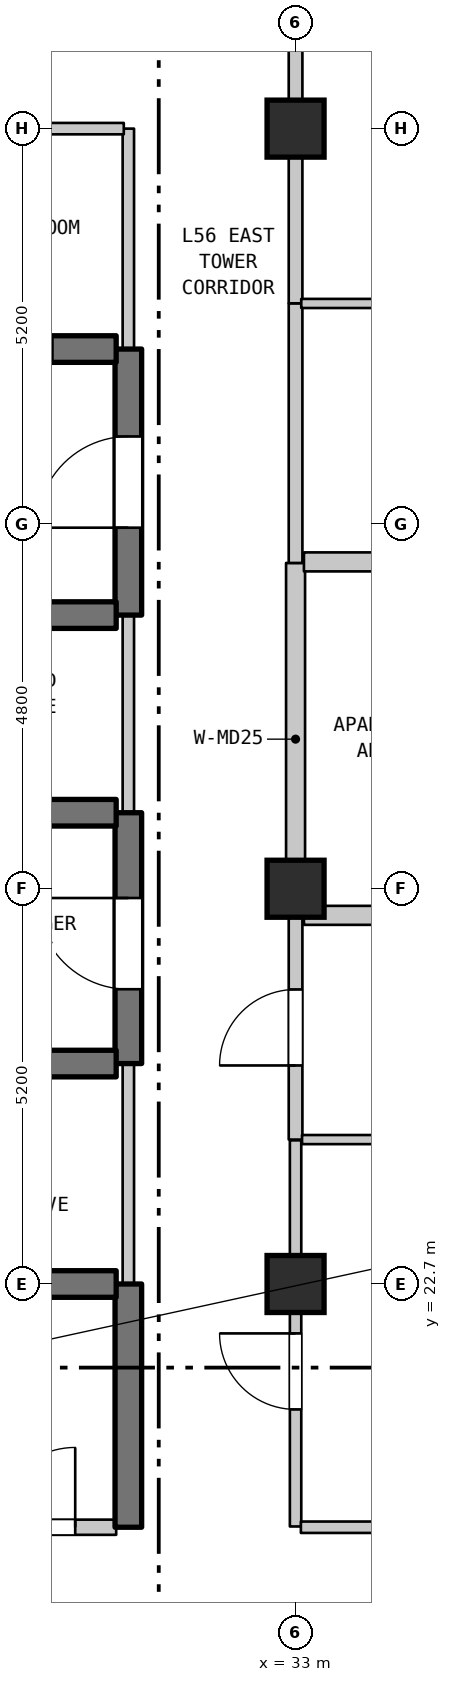
"""IFC4 building model, lengths in metres.
Left out: names, types, materials, properties, quantities, classifications, styles, units other than length and angle.
Written with IfcOpenShell. Run it as: python <this file> out.ifc"""

import sys

from ifc_helpers import new_model, si_unit, direction, frame, frame_2d, origin, origin_2d, place, context, subcontext, project, spatial, rectangle, extrude, element, fill, save


model = new_model("IFC4")
c1 = context("Model", 3, precision=1e-05, world=origin(), true_north=direction((0.0, 1.0)))
c2 = subcontext(c1, "Body", "Model", "MODEL_VIEW")
j1 = project(units=[si_unit("LENGTHUNIT", "METRE"), si_unit("PLANEANGLEUNIT", "RADIAN")], contexts=[c1])
p1 = place(None, origin())
s1 = spatial("IfcSite", under=j1, at=p1, CompositionType="ELEMENT")
p2 = place(p1, origin())
s2 = spatial("IfcBuilding", under=s1, at=p2, CompositionType="ELEMENT")
p3 = place(p2, frame((0.0, 0.0, 226.5)))
s3 = spatial("IfcBuildingStorey", under=s2, at=p3, CompositionType="ELEMENT", Elevation=226.5)
for number, where, z_axis, x_axis in (
    (1, (33.0, 22.7, 0.0), (0.0, 0.0, 1.0), (1.0, 0.0, 0.0)),
    (2, (33.0, 27.9, 0.0), (0.0, 0.0, 1.0), (1.0, 0.0, 0.0)),
    (3, (33.0, 37.9, 0.0), (0.0, 0.0, 1.0), (1.0, 0.0, 0.0)),
):
    element("IfcColumn", number, at=place(p3, frame(where, z_axis=z_axis, x_axis=x_axis)), inside=s3, PredefinedType="COLUMN", context=c2, shape_type="SweptSolid", body=[
        extrude(rectangle(XDim=0.75, YDim=0.75, at=origin_2d()), origin(), (0.0, 0.0, 1.0), 3.7),
    ])
p4 = place(p3, frame((30.8, 19.5, 0.0), z_axis=(0.0, 0.0, 1.0), x_axis=(0.0, 1.0, 0.0)))
e4 = element("IfcWall", 4, at=p4, inside=s3, PredefinedType="SHEAR", context=c2, shape_type="SweptSolid", body=[
    extrude(rectangle(XDim=3.2, YDim=0.35, at=frame_2d((1.6, 0.0))), origin(), (0.0, 0.0, 1.0), 3.39),
])
p5 = place(p3, frame((30.8, 22.7, 0.0), z_axis=(0.0, 0.0, 1.0), x_axis=(0.0, 1.0, 0.0)))
e5 = element("IfcWall", 5, at=p5, inside=s3, PredefinedType="STANDARD", context=c2, shape_type="SweptSolid", body=[
    extrude(rectangle(XDim=2.9, YDim=0.15, at=frame_2d((1.45, 0.0))), origin(), (0.0, 0.0, 1.0), 3.39),
])
p6 = place(p3, frame((30.8, 25.6, 0.0), z_axis=(0.0, 0.0, 1.0), x_axis=(0.0, 1.0, 0.0)))
e6 = element("IfcWall", 6, at=p6, inside=s3, PredefinedType="SHEAR", context=c2, shape_type="SweptSolid", body=[
    extrude(rectangle(XDim=3.3, YDim=0.35, at=frame_2d((1.65, 0.0))), origin(), (0.0, 0.0, 1.0), 3.39),
])
p7 = place(p6, frame((0.978, 0.0, 0.0)))
e7 = element("IfcOpeningElement", 7, at=p7, cuts=e6, PredefinedType="OPENING", context=c2, shape_type="SweptSolid", body=[
    extrude(rectangle(XDim=1.2, YDim=2.2, at=frame_2d((0.6, 1.1))), frame((0.0, 0.185, 0.0), z_axis=(0.0, -1.0, 0.0), x_axis=(1.0, 0.0, 0.0)), (0.0, 0.0, 1.0), 0.37),
])
p8 = place(p3, frame((30.8, 28.9, 0.0), z_axis=(0.0, 0.0, 1.0), x_axis=(0.0, 1.0, 0.0)))
e8 = element("IfcWall", 8, at=p8, inside=s3, PredefinedType="STANDARD", context=c2, shape_type="SweptSolid", body=[
    extrude(rectangle(XDim=2.6, YDim=0.15, at=frame_2d((1.3, 0.0))), origin(), (0.0, 0.0, 1.0), 3.39),
])
p9 = place(p3, frame((30.8, 31.5, 0.0), z_axis=(0.0, 0.0, 1.0), x_axis=(0.0, 1.0, 0.0)))
e9 = element("IfcWall", 9, at=p9, inside=s3, PredefinedType="SHEAR", context=c2, shape_type="SweptSolid", body=[
    extrude(rectangle(XDim=3.5, YDim=0.35, at=frame_2d((1.75, 0.0))), origin(), (0.0, 0.0, 1.0), 3.39),
])
p10 = place(p9, frame((1.15, 0.0, 0.0)))
e10 = element("IfcOpeningElement", 10, at=p10, cuts=e9, PredefinedType="OPENING", context=c2, shape_type="SweptSolid", body=[
    extrude(rectangle(XDim=1.2, YDim=2.2, at=frame_2d((0.6, 1.1))), frame((0.0, 0.185, 0.0), z_axis=(0.0, -1.0, 0.0), x_axis=(1.0, 0.0, 0.0)), (0.0, 0.0, 1.0), 0.37),
])
p11 = place(p3, frame((30.8, 35.0, 0.0), z_axis=(0.0, 0.0, 1.0), x_axis=(0.0, 1.0, 0.0)))
e11 = element("IfcWall", 11, at=p11, inside=s3, PredefinedType="STANDARD", context=c2, shape_type="SweptSolid", body=[
    extrude(rectangle(XDim=2.9, YDim=0.15, at=frame_2d((1.45, 0.0))), origin(), (0.0, 0.0, 1.0), 3.39),
])
p12 = place(p3, frame((33.0, 19.51, 0.0), z_axis=(0.0, 0.0, 1.0), x_axis=(0.0, 1.0, 0.0)))
e12 = element("IfcWall", 12, at=p12, inside=s3, PredefinedType="STANDARD", context=c2, shape_type="SweptSolid", body=[
    extrude(rectangle(XDim=5.08, YDim=0.15, at=frame_2d((2.54, 0.0))), origin(), (0.0, 0.0, 1.0), 2.99),
])
p13 = place(p12, frame((1.54, 0.0, 0.0)))
e13 = element("IfcOpeningElement", 13, at=p13, cuts=e12, PredefinedType="OPENING", context=c2, shape_type="SweptSolid", body=[
    extrude(rectangle(XDim=1.0, YDim=2.15, at=frame_2d((0.5, 1.075))), frame((0.0, 0.085, 0.0), z_axis=(0.0, -1.0, 0.0), x_axis=(1.0, 0.0, 0.0)), (0.0, 0.0, 1.0), 0.17),
])
p14 = place(p3, frame((33.0, 24.6, 0.0), z_axis=(0.0, 0.0, 1.0), x_axis=(0.0, 1.0, 0.0)))
e14 = element("IfcWall", 14, at=p14, inside=s3, PredefinedType="STANDARD", context=c2, shape_type="SweptSolid", body=[
    extrude(rectangle(XDim=2.95, YDim=0.18, at=frame_2d((1.475, 0.0))), origin(), (0.0, 0.0, 1.0), 2.99),
])
p15 = place(p14, frame((0.975, 0.0, 0.0)))
e15 = element("IfcOpeningElement", 15, at=p15, cuts=e14, PredefinedType="OPENING", context=c2, shape_type="SweptSolid", body=[
    extrude(rectangle(XDim=1.0, YDim=2.15, at=frame_2d((0.5, 1.075))), frame((0.0, 0.1, 0.0), z_axis=(0.0, -1.0, 0.0), x_axis=(1.0, 0.0, 0.0)), (0.0, 0.0, 1.0), 0.2),
])
p16 = place(p3, frame((33.0, 27.55, 0.0), z_axis=(0.0, 0.0, 1.0), x_axis=(0.0, 1.0, 0.0)))
e16 = element("IfcWall", 16, at=p16, inside=s3, PredefinedType="STANDARD", context=c2, shape_type="SweptSolid", body=[
    extrude(rectangle(XDim=4.636, YDim=0.25, at=frame_2d((2.318, 0.0))), origin(), (0.0, 0.0, 1.0), 2.89),
])
p17 = place(p3, frame((33.0, 32.186, 0.0), z_axis=(0.0, 0.0, 1.0), x_axis=(0.0, 1.0, 0.0)))
e17 = element("IfcWall", 17, at=p17, inside=s3, PredefinedType="STANDARD", context=c2, shape_type="SweptSolid", body=[
    extrude(rectangle(XDim=3.416, YDim=0.18, at=frame_2d((1.708, 0.0))), origin(), (0.0, 0.0, 1.0), 2.89),
])
p18 = place(p3, frame((33.0, 35.602, 0.0), z_axis=(0.0, 0.0, 1.0), x_axis=(0.0, 1.0, 0.0)))
e18 = element("IfcWall", 18, at=p18, inside=s3, PredefinedType="STANDARD", context=c2, shape_type="SweptSolid", body=[
    extrude(rectangle(XDim=2.298, YDim=0.18, at=frame_2d((1.149, 0.0))), origin(), (0.0, 0.0, 1.0), 2.89),
])
p19 = place(p3, frame((28.585, 19.5, 0.0), z_axis=(0.0, 0.0, 1.0), x_axis=(1.0, 0.0, 0.0)))
e19 = element("IfcWall", 19, at=p19, inside=s3, PredefinedType="STANDARD", context=c2, shape_type="SweptSolid", body=[
    extrude(rectangle(XDim=2.055, YDim=0.2, at=frame_2d((1.027, 0.0))), origin(), (0.0, 0.0, 1.0), 3.39),
])
p20 = place(p19, frame((0.466, 0.0, 0.0)))
e20 = element("IfcOpeningElement", 20, at=p20, cuts=e19, PredefinedType="OPENING", context=c2, shape_type="SweptSolid", body=[
    extrude(rectangle(XDim=1.05, YDim=2.15, at=frame_2d((0.525, 1.075))), frame((0.0, 0.11, 0.0), z_axis=(0.0, -1.0, 0.0), x_axis=(1.0, 0.0, 0.0)), (0.0, 0.0, 1.0), 0.22),
])
p21 = place(p3, frame((33.07, 19.5, 0.0), z_axis=(0.0, 0.0, 1.0), x_axis=(1.0, 0.0, 0.0)))
e21 = element("IfcWall", 21, at=p21, inside=s3, PredefinedType="STANDARD", context=c2, shape_type="SweptSolid", body=[
    extrude(rectangle(XDim=18.87, YDim=0.15, at=frame_2d((9.435, 0.0))), origin(), (0.0, 0.0, 1.0), 3.39),
])
p22 = place(p21, frame((8.935, 0.0, 0.0)))
e22 = element("IfcOpeningElement", 22, at=p22, cuts=e21, PredefinedType="OPENING", context=c2, shape_type="SweptSolid", body=[
    extrude(rectangle(XDim=1.0, YDim=2.15, at=frame_2d((0.5, 1.075))), frame((0.0, 0.085, 0.0), z_axis=(0.0, -1.0, 0.0), x_axis=(1.0, 0.0, 0.0)), (0.0, 0.0, 1.0), 0.17),
])
p23 = place(p3, frame((28.585, 22.7, 0.0), z_axis=(0.0, 0.0, 1.0), x_axis=(1.0, 0.0, 0.0)))
e23 = element("IfcWall", 23, at=p23, inside=s3, PredefinedType="SHEAR", context=c2, shape_type="SweptSolid", body=[
    extrude(rectangle(XDim=2.055, YDim=0.35, at=frame_2d((1.027, 0.0))), origin(), (0.0, 0.0, 1.0), 3.39),
])
p24 = place(p3, frame((33.085, 24.6, 0.0), z_axis=(0.0, 0.0, 1.0), x_axis=(1.0, 0.0, 0.0)))
e24 = element("IfcWall", 24, at=p24, inside=s3, PredefinedType="PARTITIONING", context=c2, shape_type="SweptSolid", body=[
    extrude(rectangle(XDim=3.47, YDim=0.12, at=frame_2d((1.735, 0.0))), origin(), (0.0, 0.0, 1.0), 3.39),
])
p25 = place(p3, frame((27.46, 25.6, 0.0), z_axis=(0.0, 0.0, 1.0), x_axis=(1.0, 0.0, 0.0)))
e25 = element("IfcWall", 25, at=p25, inside=s3, PredefinedType="SHEAR", context=c2, shape_type="SweptSolid", body=[
    extrude(rectangle(XDim=3.18, YDim=0.35, at=frame_2d((1.59, 0.0))), origin(), (0.0, 0.0, 1.0), 3.39),
])
p26 = place(p25, frame((1.115, 0.0, 0.0)))
e26 = element("IfcOpeningElement", 26, at=p26, cuts=e25, PredefinedType="OPENING", context=c2, shape_type="SweptSolid", body=[
    extrude(rectangle(XDim=0.95, YDim=2.15, at=frame_2d((0.475, 1.075))), frame((0.0, 0.185, 0.0), z_axis=(0.0, -1.0, 0.0), x_axis=(1.0, 0.0, 0.0)), (0.0, 0.0, 1.0), 0.37),
])
p27 = place(p3, frame((33.11, 27.55, 0.0), z_axis=(0.0, 0.0, 1.0), x_axis=(1.0, 0.0, 0.0)))
e27 = element("IfcWall", 27, at=p27, inside=s3, PredefinedType="STANDARD", context=c2, shape_type="SweptSolid", body=[
    extrude(rectangle(XDim=4.36, YDim=0.25, at=frame_2d((2.18, 0.0))), origin(), (0.0, 0.0, 1.0), 3.39),
])
p28 = place(p3, frame((27.46, 28.9, 0.0), z_axis=(0.0, 0.0, 1.0), x_axis=(1.0, 0.0, 0.0)))
e28 = element("IfcWall", 28, at=p28, inside=s3, PredefinedType="SHEAR", context=c2, shape_type="SweptSolid", body=[
    extrude(rectangle(XDim=3.18, YDim=0.35, at=frame_2d((1.59, 0.0))), origin(), (0.0, 0.0, 1.0), 3.39),
])
p29 = place(p28, frame((1.115, 0.0, 0.0)))
e29 = element("IfcOpeningElement", 29, at=p29, cuts=e28, PredefinedType="OPENING", context=c2, shape_type="SweptSolid", body=[
    extrude(rectangle(XDim=0.95, YDim=2.15, at=frame_2d((0.475, 1.075))), frame((0.0, 0.185, 0.0), z_axis=(0.0, -1.0, 0.0), x_axis=(1.0, 0.0, 0.0)), (0.0, 0.0, 1.0), 0.37),
])
p30 = place(p3, frame((27.46, 31.5, 0.0), z_axis=(0.0, 0.0, 1.0), x_axis=(1.0, 0.0, 0.0)))
e30 = element("IfcWall", 30, at=p30, inside=s3, PredefinedType="SHEAR", context=c2, shape_type="SweptSolid", body=[
    extrude(rectangle(XDim=3.18, YDim=0.35, at=frame_2d((1.59, 0.0))), origin(), (0.0, 0.0, 1.0), 3.39),
])
p31 = place(p3, frame((33.11, 32.2, 0.0), z_axis=(0.0, 0.0, 1.0), x_axis=(1.0, 0.0, 0.0)))
e31 = element("IfcWall", 31, at=p31, inside=s3, PredefinedType="STANDARD", context=c2, shape_type="SweptSolid", body=[
    extrude(rectangle(XDim=4.36, YDim=0.25, at=frame_2d((2.18, 0.0))), origin(), (0.0, 0.0, 1.0), 3.39),
])
p32 = place(p3, frame((28.045, 35.0, 0.0), z_axis=(0.0, 0.0, 1.0), x_axis=(1.0, 0.0, 0.0)))
e32 = element("IfcWall", 32, at=p32, inside=s3, PredefinedType="SHEAR", context=c2, shape_type="SweptSolid", body=[
    extrude(rectangle(XDim=2.595, YDim=0.35, at=frame_2d((1.297, 0.0))), origin(), (0.0, 0.0, 1.0), 3.39),
])
p33 = place(p32, frame((0.806, 0.0, 0.0)))
e33 = element("IfcOpeningElement", 33, at=p33, cuts=e32, PredefinedType="OPENING", context=c2, shape_type="SweptSolid", body=[
    extrude(rectangle(XDim=0.95, YDim=2.15, at=frame_2d((0.475, 1.075))), frame((0.0, 0.185, 0.0), z_axis=(0.0, -1.0, 0.0), x_axis=(1.0, 0.0, 0.0)), (0.0, 0.0, 1.0), 0.37),
])
p34 = place(p3, frame((33.075, 35.6, 0.0), z_axis=(0.0, 0.0, 1.0), x_axis=(1.0, 0.0, 0.0)))
e34 = element("IfcWall", 34, at=p34, inside=s3, PredefinedType="PARTITIONING", context=c2, shape_type="SweptSolid", body=[
    extrude(rectangle(XDim=4.46, YDim=0.12, at=frame_2d((2.23, 0.0))), origin(), (0.0, 0.0, 1.0), 3.39),
])
p35 = place(p3, frame((28.045, 37.9, 0.0), z_axis=(0.0, 0.0, 1.0), x_axis=(1.0, 0.0, 0.0)))
e35 = element("IfcWall", 35, at=p35, inside=s3, PredefinedType="STANDARD", context=c2, shape_type="SweptSolid", body=[
    extrude(rectangle(XDim=2.695, YDim=0.15, at=frame_2d((1.348, 0.0))), origin(), (0.0, 0.0, 1.0), 2.89),
])
p36 = place(p3, frame((33.0, 37.9, 0.0), z_axis=(0.0, 0.0, 1.0), x_axis=(0.0, 1.0, 0.0)))
e36 = element("IfcWall", 36, at=p36, inside=s3, PredefinedType="STANDARD", context=c2, shape_type="SweptSolid", body=[
    extrude(rectangle(XDim=1.85, YDim=0.18, at=frame_2d((0.925, 0.0))), origin(), (0.0, 0.0, 1.0), 2.79),
])
p37 = place(p7, origin())
e37 = element("IfcDoor", 37, at=p37, inside=s3, OperationType="SINGLE_SWING_RIGHT", PredefinedType="DOOR", context=c2, shape_type="SweptSolid", body=[
    extrude(rectangle(XDim=1.2, YDim=2.2, at=frame_2d((0.6, 1.1))), frame((0.0, 0.025, 0.0), z_axis=(0.0, -1.0, 0.0), x_axis=(1.0, 0.0, 0.0)), (0.0, 0.0, 1.0), 0.05),
])
fill(e7, e37)
p38 = place(p10, origin())
e38 = element("IfcDoor", 38, at=p38, inside=s3, OperationType="SINGLE_SWING_LEFT", PredefinedType="DOOR", context=c2, shape_type="SweptSolid", body=[
    extrude(rectangle(XDim=1.2, YDim=2.2, at=frame_2d((0.6, 1.1))), frame((0.0, 0.025, 0.0), z_axis=(0.0, -1.0, 0.0), x_axis=(1.0, 0.0, 0.0)), (0.0, 0.0, 1.0), 0.05),
])
fill(e10, e38)
p39 = place(p13, origin())
e39 = element("IfcDoor", 39, at=p39, inside=s3, OperationType="SINGLE_SWING_RIGHT", PredefinedType="DOOR", context=c2, shape_type="SweptSolid", body=[
    extrude(rectangle(XDim=1.0, YDim=2.15, at=frame_2d((0.5, 1.075))), frame((0.0, 0.025, 0.0), z_axis=(0.0, -1.0, 0.0), x_axis=(1.0, 0.0, 0.0)), (0.0, 0.0, 1.0), 0.05),
])
fill(e13, e39)
p40 = place(p15, origin())
e40 = element("IfcDoor", 40, at=p40, inside=s3, OperationType="SINGLE_SWING_LEFT", PredefinedType="DOOR", context=c2, shape_type="SweptSolid", body=[
    extrude(rectangle(XDim=1.0, YDim=2.15, at=frame_2d((0.5, 1.075))), frame((0.0, 0.025, 0.0), z_axis=(0.0, -1.0, 0.0), x_axis=(1.0, 0.0, 0.0)), (0.0, 0.0, 1.0), 0.05),
])
fill(e15, e40)
p41 = place(p20, origin())
e41 = element("IfcDoor", 41, at=p41, inside=s3, OperationType="SINGLE_SWING_RIGHT", PredefinedType="DOOR", context=c2, shape_type="SweptSolid", body=[
    extrude(rectangle(XDim=1.05, YDim=2.15, at=frame_2d((0.525, 1.075))), frame((0.0, 0.025, 0.0), z_axis=(0.0, -1.0, 0.0), x_axis=(1.0, 0.0, 0.0)), (0.0, 0.0, 1.0), 0.05),
])
fill(e20, e41)
p42 = place(p33, frame((0.95, 0.0, 0.0), z_axis=(0.0, 0.0, 1.0), x_axis=(-1.0, 0.0, 0.0)))
e42 = element("IfcDoor", 42, at=p42, inside=s3, OperationType="SINGLE_SWING_LEFT", PredefinedType="DOOR", context=c2, shape_type="SweptSolid", body=[
    extrude(rectangle(XDim=0.95, YDim=2.15, at=frame_2d((0.475, 1.075))), frame((0.0, 0.025, 0.0), z_axis=(0.0, -1.0, 0.0), x_axis=(1.0, 0.0, 0.0)), (0.0, 0.0, 1.0), 0.05),
])
fill(e33, e42)
save(model, sys.argv[1])
